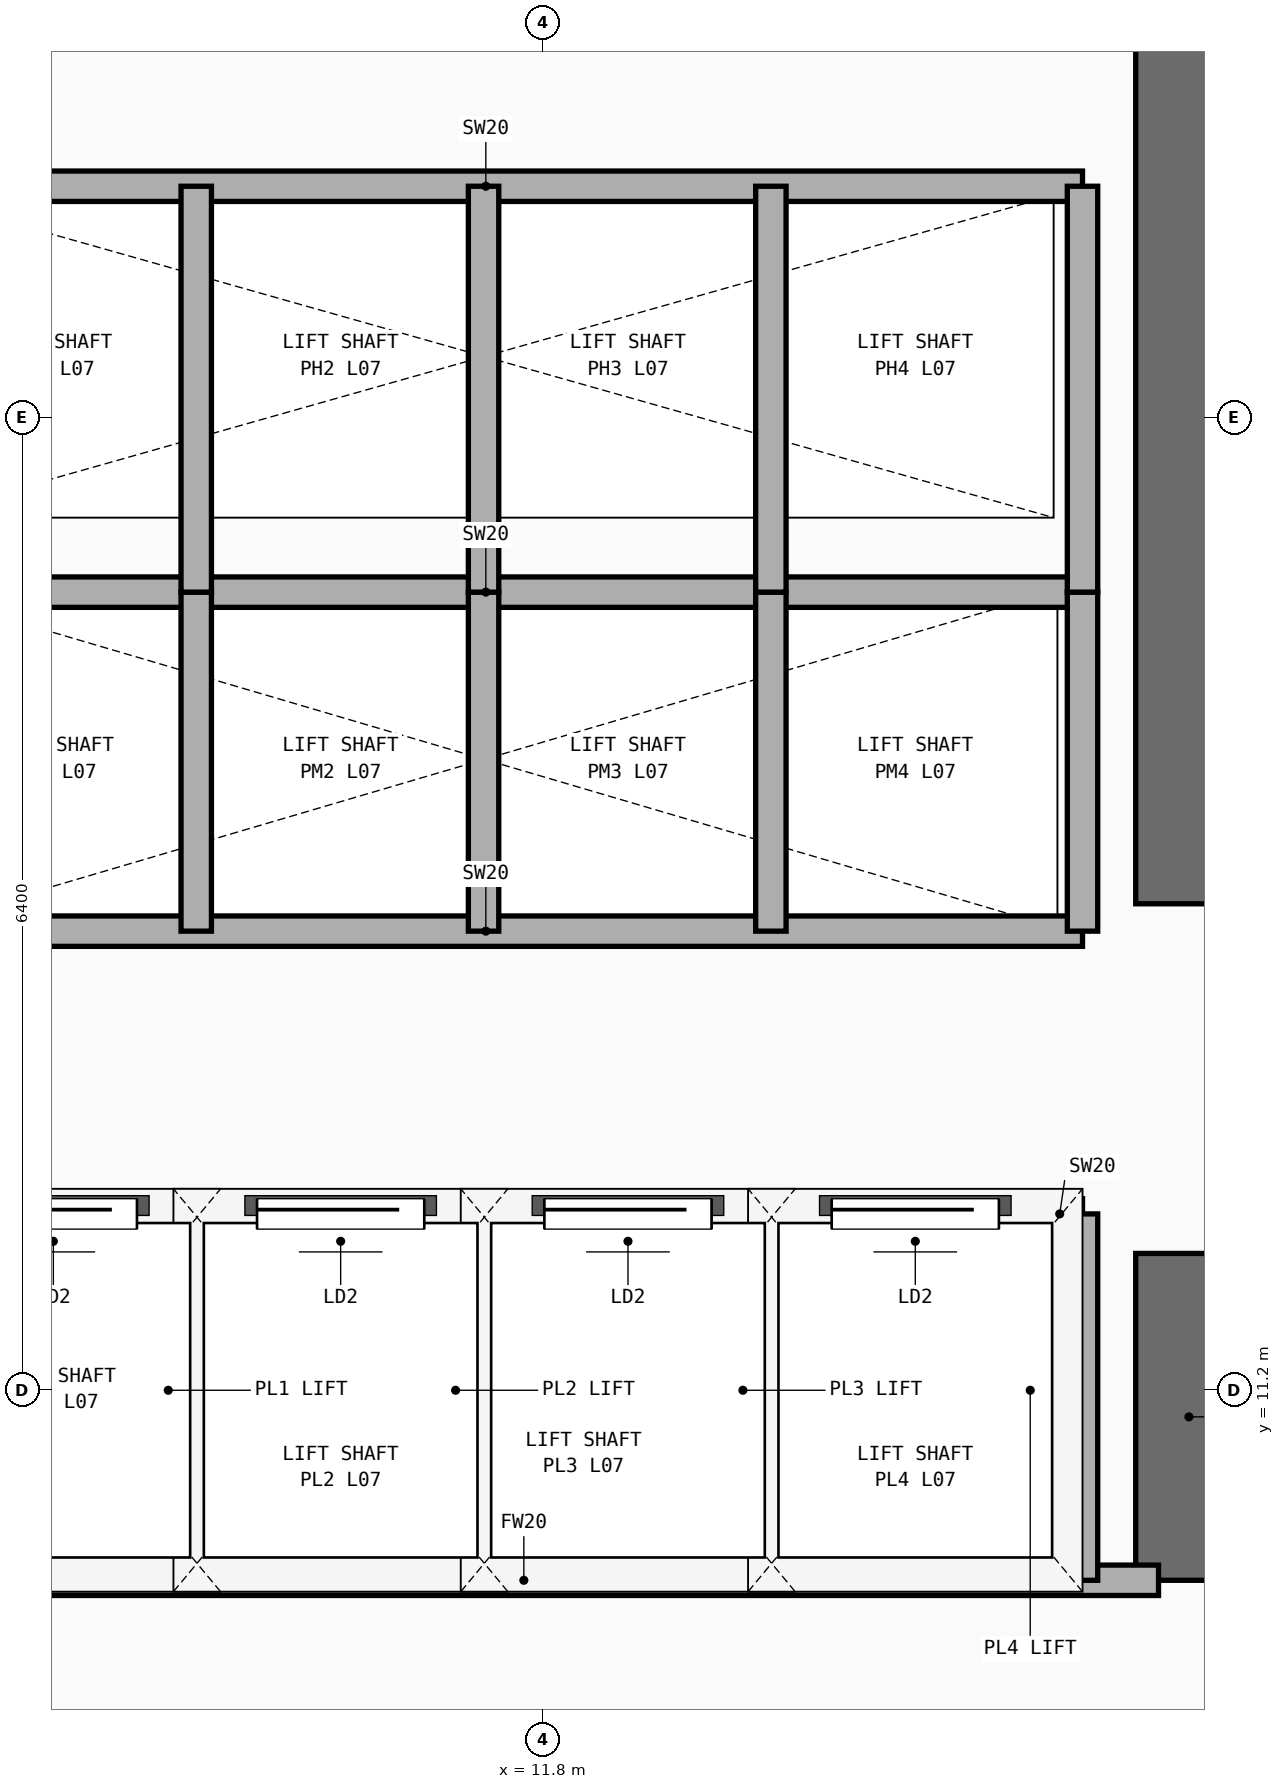
"""IFC4 building model, lengths in metres.
Left out: names, types, materials, properties, quantities, classifications, styles, units other than length and angle.
Written with IfcOpenShell. Run it as: python <this file> out.ifc"""

import sys

from ifc_helpers import new_model, si_unit, direction, frame, frame_2d, origin, place, context, subcontext, project, spatial, rectangle, extrude, element, fill, save


model = new_model("IFC4")
c1 = context("Model", 3, precision=1e-05, world=origin(), true_north=direction((0.0, 1.0)))
c2 = subcontext(c1, "Body", "Model", "MODEL_VIEW")
j1 = project(units=[si_unit("LENGTHUNIT", "METRE"), si_unit("PLANEANGLEUNIT", "RADIAN")], contexts=[c1])
p1 = place(None, origin())
s1 = spatial("IfcSite", under=j1, at=p1, CompositionType="ELEMENT")
p2 = place(p1, origin())
s2 = spatial("IfcBuilding", under=s1, at=p2, CompositionType="ELEMENT")
p3 = place(p2, frame((0.0, 0.0, 29.6)))
s3 = spatial("IfcBuildingStorey", under=s2, at=p3, CompositionType="ELEMENT", Elevation=29.6)
p4 = place(p3, frame((16.05, 9.95, 0.0), z_axis=(0.0, 0.0, 1.0), x_axis=(0.0, 1.0, 0.0)))
e1 = element("IfcWall", 1, at=p4, inside=s3, PredefinedType="SHEAR", context=c2, shape_type="SweptSolid", body=[
    extrude(rectangle(XDim=2.15, YDim=0.7, at=frame_2d((1.075, 0.0))), origin(), (0.0, 0.0, 1.0), 3.54),
])
p5 = place(p3, frame((16.05, 14.4, 0.0), z_axis=(0.0, 0.0, 1.0), x_axis=(0.0, 1.0, 0.0)))
e2 = element("IfcWall", 2, at=p5, inside=s3, PredefinedType="SHEAR", context=c2, shape_type="SweptSolid", body=[
    extrude(rectangle(XDim=9.1, YDim=0.7, at=frame_2d((4.55, 0.0))), origin(), (0.0, 0.0, 1.0), 3.54),
])
p6 = place(p3, frame((7.5, 9.95, 0.0), z_axis=(0.0, 0.0, 1.0), x_axis=(1.0, 0.0, 0.0)))
e3 = element("IfcWall", 3, at=p6, inside=s3, PredefinedType="PARTITIONING", context=c2, shape_type="SweptSolid", body=[
    extrude(rectangle(XDim=8.35, YDim=0.2, at=frame_2d((4.175, 0.0))), origin(), (0.0, 0.0, 1.0), 3.54),
])
p7 = place(p3, frame((7.5, 12.36, 0.0), z_axis=(0.0, 0.0, 1.0), x_axis=(1.0, 0.0, 0.0)))
e4 = element("IfcWall", 4, at=p7, inside=s3, PredefinedType="PARTITIONING", context=c2, shape_type="SweptSolid", body=[
    extrude(rectangle(XDim=7.85, YDim=0.2, at=frame_2d((3.925, 0.0))), origin(), (0.0, 0.0, 1.0), 3.54),
])
p8 = place(p7, frame((0.53, 0.0, 0.0)))
e5 = element("IfcOpeningElement", 5, at=p8, cuts=e4, PredefinedType="OPENING", context=c2, shape_type="SweptSolid", body=[
    extrude(rectangle(XDim=1.1, YDim=2.2, at=frame_2d((0.55, 1.1))), frame((0.0, 0.11, 0.0), z_axis=(0.0, -1.0, 0.0), x_axis=(1.0, 0.0, 0.0)), (0.0, 0.0, 1.0), 0.22),
])
p9 = place(p7, frame((2.42, 0.0, 0.0)))
e6 = element("IfcOpeningElement", 6, at=p9, cuts=e4, PredefinedType="OPENING", context=c2, shape_type="SweptSolid", body=[
    extrude(rectangle(XDim=1.1, YDim=2.2, at=frame_2d((0.55, 1.1))), frame((0.0, 0.11, 0.0), z_axis=(0.0, -1.0, 0.0), x_axis=(1.0, 0.0, 0.0)), (0.0, 0.0, 1.0), 0.22),
])
p10 = place(p7, frame((4.31, 0.0, 0.0)))
e7 = element("IfcOpeningElement", 7, at=p10, cuts=e4, PredefinedType="OPENING", context=c2, shape_type="SweptSolid", body=[
    extrude(rectangle(XDim=1.1, YDim=2.2, at=frame_2d((0.55, 1.1))), frame((0.0, 0.11, 0.0), z_axis=(0.0, -1.0, 0.0), x_axis=(1.0, 0.0, 0.0)), (0.0, 0.0, 1.0), 0.22),
])
p11 = place(p7, frame((6.2, 0.0, 0.0)))
e8 = element("IfcOpeningElement", 8, at=p11, cuts=e4, PredefinedType="OPENING", context=c2, shape_type="SweptSolid", body=[
    extrude(rectangle(XDim=1.1, YDim=2.2, at=frame_2d((0.55, 1.1))), frame((0.0, 0.11, 0.0), z_axis=(0.0, -1.0, 0.0), x_axis=(1.0, 0.0, 0.0)), (0.0, 0.0, 1.0), 0.22),
])
for number, where, z_axis, x_axis in (
    (9, (15.35, 9.95, 0.0), (0.0, 0.0, 1.0), (0.0, 1.0, 0.0)),
    (10, (9.52, 9.95, 0.0), (0.0, 0.0, 1.0), (0.0, 1.0, 0.0)),
    (11, (11.41, 9.95, 0.0), (0.0, 0.0, 1.0), (0.0, 1.0, 0.0)),
    (12, (13.3, 9.95, 0.0), (0.0, 0.0, 1.0), (0.0, 1.0, 0.0)),
):
    element("IfcWall", number, at=place(p3, frame(where, z_axis=z_axis, x_axis=x_axis)), inside=s3, PredefinedType="PARTITIONING", context=c2, shape_type="SweptSolid", body=[
        extrude(rectangle(XDim=2.41, YDim=0.2, at=frame_2d((1.205, 0.0))), origin(), (0.0, 0.0, 1.0), 3.54),
    ])
for number, where, z_axis, x_axis in (
    (13, (7.5, 14.22, 0.0), (0.0, 0.0, 1.0), (1.0, 0.0, 0.0)),
    (14, (7.5, 16.45, 0.0), (0.0, 0.0, 1.0), (1.0, 0.0, 0.0)),
):
    element("IfcWall", number, at=place(p3, frame(where, z_axis=z_axis, x_axis=x_axis)), inside=s3, PredefinedType="PARTITIONING", context=c2, shape_type="SweptSolid", body=[
        extrude(rectangle(XDim=7.85, YDim=0.2, at=frame_2d((3.925, 0.0))), origin(), (0.0, 0.0, 1.0), 3.54),
    ])
for number, where, z_axis, x_axis in (
    (15, (15.35, 14.22, 0.0), (0.0, 0.0, 1.0), (0.0, 1.0, 0.0)),
    (16, (9.52, 14.22, 0.0), (0.0, 0.0, 1.0), (0.0, 1.0, 0.0)),
    (17, (11.41, 14.22, 0.0), (0.0, 0.0, 1.0), (0.0, 1.0, 0.0)),
    (18, (13.3, 14.22, 0.0), (0.0, 0.0, 1.0), (0.0, 1.0, 0.0)),
):
    element("IfcWall", number, at=place(p3, frame(where, z_axis=z_axis, x_axis=x_axis)), inside=s3, PredefinedType="PARTITIONING", context=c2, shape_type="SweptSolid", body=[
        extrude(rectangle(XDim=2.23, YDim=0.2, at=frame_2d((1.115, 0.0))), origin(), (0.0, 0.0, 1.0), 3.54),
    ])
p12 = place(p3, frame((7.5, 19.12, 0.0), z_axis=(0.0, 0.0, 1.0), x_axis=(1.0, 0.0, 0.0)))
e19 = element("IfcWall", 19, at=p12, inside=s3, PredefinedType="PARTITIONING", context=c2, shape_type="SweptSolid", body=[
    extrude(rectangle(XDim=7.85, YDim=0.2, at=frame_2d((3.925, 0.0))), origin(), (0.0, 0.0, 1.0), 3.54),
])
for number, where, z_axis, x_axis in (
    (20, (15.35, 16.45, 0.0), (0.0, 0.0, 1.0), (0.0, 1.0, 0.0)),
    (21, (9.52, 16.45, 0.0), (0.0, 0.0, 1.0), (0.0, 1.0, 0.0)),
    (22, (11.41, 16.45, 0.0), (0.0, 0.0, 1.0), (0.0, 1.0, 0.0)),
    (23, (13.3, 16.45, 0.0), (0.0, 0.0, 1.0), (0.0, 1.0, 0.0)),
):
    element("IfcWall", number, at=place(p3, frame(where, z_axis=z_axis, x_axis=x_axis)), inside=s3, PredefinedType="PARTITIONING", context=c2, shape_type="SweptSolid", body=[
        extrude(rectangle(XDim=2.67, YDim=0.2, at=frame_2d((1.335, 0.0))), origin(), (0.0, 0.0, 1.0), 3.54),
    ])
p13 = place(p8, origin())
e24 = element("IfcDoor", 24, at=p13, inside=s3, OperationType="SLIDING_TO_LEFT", PredefinedType="DOOR", context=c2, shape_type="SweptSolid", body=[
    extrude(rectangle(XDim=1.1, YDim=2.2, at=frame_2d((0.55, 1.1))), frame((0.0, 0.025, 0.0), z_axis=(0.0, -1.0, 0.0), x_axis=(1.0, 0.0, 0.0)), (0.0, 0.0, 1.0), 0.05),
])
fill(e5, e24)
p14 = place(p9, origin())
e25 = element("IfcDoor", 25, at=p14, inside=s3, OperationType="SLIDING_TO_LEFT", PredefinedType="DOOR", context=c2, shape_type="SweptSolid", body=[
    extrude(rectangle(XDim=1.1, YDim=2.2, at=frame_2d((0.55, 1.1))), frame((0.0, 0.025, 0.0), z_axis=(0.0, -1.0, 0.0), x_axis=(1.0, 0.0, 0.0)), (0.0, 0.0, 1.0), 0.05),
])
fill(e6, e25)
p15 = place(p10, origin())
e26 = element("IfcDoor", 26, at=p15, inside=s3, OperationType="SLIDING_TO_LEFT", PredefinedType="DOOR", context=c2, shape_type="SweptSolid", body=[
    extrude(rectangle(XDim=1.1, YDim=2.2, at=frame_2d((0.55, 1.1))), frame((0.0, 0.025, 0.0), z_axis=(0.0, -1.0, 0.0), x_axis=(1.0, 0.0, 0.0)), (0.0, 0.0, 1.0), 0.05),
])
fill(e7, e26)
p16 = place(p11, origin())
e27 = element("IfcDoor", 27, at=p16, inside=s3, OperationType="SLIDING_TO_LEFT", PredefinedType="DOOR", context=c2, shape_type="SweptSolid", body=[
    extrude(rectangle(XDim=1.1, YDim=2.2, at=frame_2d((0.55, 1.1))), frame((0.0, 0.025, 0.0), z_axis=(0.0, -1.0, 0.0), x_axis=(1.0, 0.0, 0.0)), (0.0, 0.0, 1.0), 0.05),
])
fill(e8, e27)
save(model, sys.argv[1])
